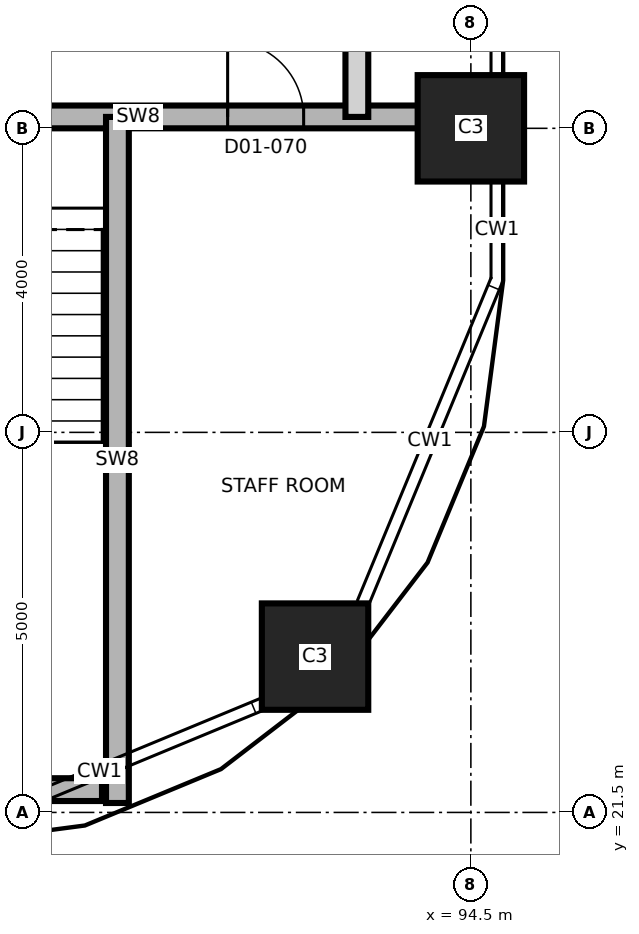
"""IFC4 building model, lengths in metres.
Left out: names, types, materials, properties, quantities, classifications, styles, units other than length and angle.
Written with IfcOpenShell. Run it as: python <this file> out.ifc"""

import sys

from ifc_helpers import new_model, si_unit, direction, frame, frame_2d, origin, origin_2d, place, context, subcontext, project, spatial, rectangle, extrude, element, fill, save


model = new_model("IFC4")
c1 = context("Model", 3, precision=1e-05, world=origin(), true_north=direction((0.0, 1.0)))
c2 = subcontext(c1, "Body", "Model", "MODEL_VIEW")
j1 = project(units=[si_unit("LENGTHUNIT", "METRE"), si_unit("PLANEANGLEUNIT", "RADIAN")], contexts=[c1])
p1 = place(None, origin())
s1 = spatial("IfcSite", under=j1, at=p1, CompositionType="ELEMENT")
p2 = place(p1, origin())
s2 = spatial("IfcBuilding", under=s1, at=p2, CompositionType="ELEMENT")
p3 = place(p2, frame((0.0, 0.0, 37.2)))
s3 = spatial("IfcBuildingStorey", under=s2, at=p3, CompositionType="ELEMENT", Elevation=37.2)
for number, where, z_axis, x_axis in (
    (1, (92.45, 23.55, 0.0), (0.0, 0.0, 1.0), (1.0, 0.0, 0.0)),
    (2, (94.5, 30.5, 0.0), (0.0, 0.0, 1.0), (1.0, 0.0, 0.0)),
):
    element("IfcColumn", number, at=place(p3, frame(where, z_axis=z_axis, x_axis=x_axis)), inside=s3, PredefinedType="COLUMN", context=c2, shape_type="SweptSolid", body=[
        extrude(rectangle(XDim=1.4, YDim=1.4, at=origin_2d()), origin(), (0.0, 0.0, 1.0), 3.7),
    ])
p4 = place(p3, frame((86.85, 21.8, 0.0), z_axis=(0.0, 0.0, 1.0), x_axis=(1.0, 0.0, 0.0)))
e3 = element("IfcWall", 3, at=p4, inside=s3, PredefinedType="SHEAR", context=c2, shape_type="SweptSolid", body=[
    extrude(rectangle(XDim=2.797, YDim=0.3, at=frame_2d((1.398, 0.0))), origin(), (0.0, 0.0, 1.0), 3.4),
])
p5 = place(p3, frame((85.67, 30.65, 0.0), z_axis=(0.0, 0.0, 1.0), x_axis=(1.0, 0.0, 0.0)))
e4 = element("IfcWall", 4, at=p5, inside=s3, PredefinedType="SHEAR", context=c2, shape_type="SweptSolid", body=[
    extrude(rectangle(XDim=8.905, YDim=0.3, at=frame_2d((4.453, 0.0))), origin(), (0.0, 0.0, 1.0), 3.4),
])
p6 = place(p5, frame((2.08, 0.0, 0.0)))
e5 = element("IfcOpeningElement", 5, at=p6, cuts=e4, PredefinedType="OPENING", context=c2, shape_type="SweptSolid", body=[
    extrude(rectangle(XDim=1.2, YDim=2.1, at=frame_2d((0.6, 1.05))), frame((0.0, 0.16, 0.0), z_axis=(0.0, -1.0, 0.0), x_axis=(1.0, 0.0, 0.0)), (0.0, 0.0, 1.0), 0.32),
])
p7 = place(p5, frame((5.63, 0.0, 0.0)))
e6 = element("IfcOpeningElement", 6, at=p7, cuts=e4, PredefinedType="OPENING", context=c2, shape_type="SweptSolid", body=[
    extrude(rectangle(XDim=1.0, YDim=2.1, at=frame_2d((0.5, 1.05))), frame((0.0, 0.16, 0.0), z_axis=(0.0, -1.0, 0.0), x_axis=(1.0, 0.0, 0.0)), (0.0, 0.0, 1.0), 0.32),
])
p8 = place(p3, frame((89.85, 21.624, 0.0), z_axis=(0.0, 0.0, 1.0), x_axis=(0.0, 1.0, 0.0)))
e7 = element("IfcWall", 7, at=p8, inside=s3, PredefinedType="SHEAR", context=c2, shape_type="SweptSolid", body=[
    extrude(rectangle(XDim=9.026, YDim=0.3, at=frame_2d((4.513, 0.0))), origin(), (0.0, 0.0, 1.0), 3.4),
])
p9 = place(p3, frame((93.0, 30.65, 0.0), z_axis=(0.0, 0.0, 1.0), x_axis=(0.0, 1.0, 0.0)))
e8 = element("IfcWall", 8, at=p9, inside=s3, PredefinedType="PARTITIONING", context=c2, shape_type="SweptSolid", body=[
    extrude(rectangle(XDim=2.7, YDim=0.3, at=frame_2d((1.35, 0.0))), origin(), (0.0, 0.0, 1.0), 3.4),
])
p10 = place(p7, origin())
e9 = element("IfcDoor", 9, at=p10, inside=s3, OperationType="SINGLE_SWING_LEFT", PredefinedType="DOOR", context=c2, shape_type="SweptSolid", body=[
    extrude(rectangle(XDim=1.0, YDim=2.1, at=frame_2d((0.5, 1.05))), frame((0.0, 0.025, 0.0), z_axis=(0.0, -1.0, 0.0), x_axis=(1.0, 0.0, 0.0)), (0.0, 0.0, 1.0), 0.05),
])
fill(e6, e9)
save(model, sys.argv[1])
